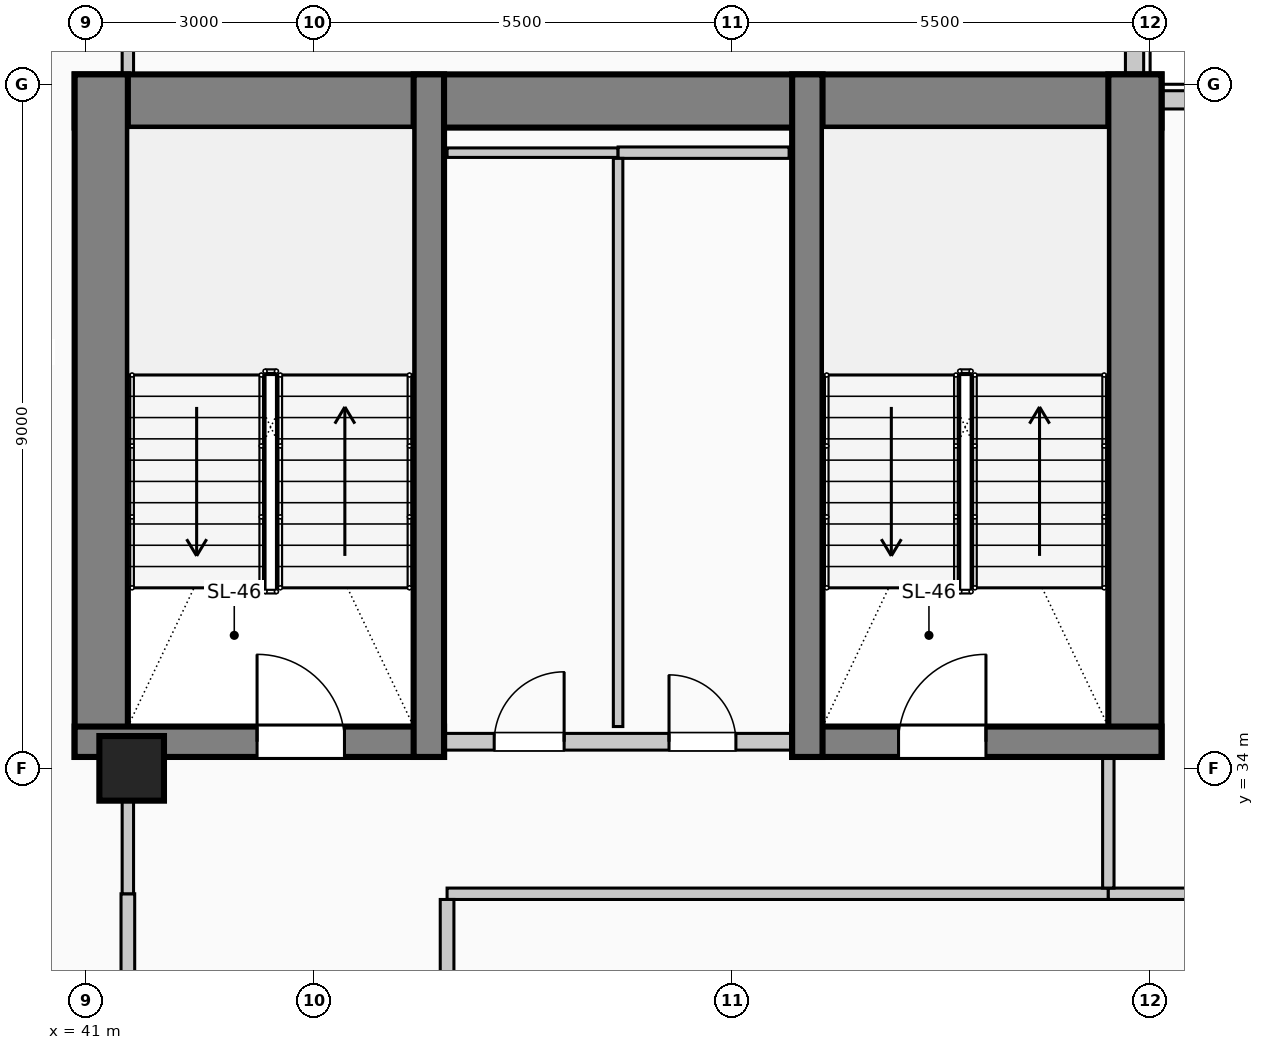
"""IFC4 building model, lengths in metres.
Left out: names, types, materials, properties, quantities, classifications, styles, units other than length and angle.
Written with IfcOpenShell. Run it as: python <this file> out.ifc"""

import sys

from ifc_helpers import new_model, si_unit, direction, frame, frame_2d, origin, origin_2d, place, context, subcontext, project, spatial, rectangle, circle, extrude, element, fill, save


model = new_model("IFC4")
c1 = context("Model", 3, precision=1e-05, world=origin(), true_north=direction((0.0, 1.0)))
c2 = subcontext(c1, "Body", "Model", "MODEL_VIEW")
j1 = project(units=[si_unit("LENGTHUNIT", "METRE"), si_unit("PLANEANGLEUNIT", "RADIAN")], contexts=[c1])
p1 = place(None, origin())
s1 = spatial("IfcSite", under=j1, at=p1, CompositionType="ELEMENT")
p2 = place(p1, origin())
s2 = spatial("IfcBuilding", under=s1, at=p2, CompositionType="ELEMENT")
p3 = place(p2, frame((0.0, 0.0, 226.6)))
s3 = spatial("IfcBuildingStorey", under=s2, at=p3, CompositionType="ELEMENT", Elevation=226.6)
p4 = place(p3, frame((40.85, 42.78, 0.0), z_axis=(0.0, 0.0, 1.0), x_axis=(1.0, 0.0, 0.0)))
e1 = element("IfcWall", 1, at=p4, inside=s3, PredefinedType="SHEAR", context=c2, shape_type="SweptSolid", body=[
    extrude(rectangle(XDim=14.3, YDim=0.7, at=frame_2d((7.15, 0.0))), origin(), (0.0, 0.0, 1.0), 4.0),
])
for number, where, z_axis, x_axis in (
    (2, (41.2, 34.15, 0.0), (0.0, 0.0, 1.0), (0.0, 1.0, 0.0)),
    (3, (54.8, 34.15, 0.0), (0.0, 0.0, 1.0), (0.0, 1.0, 0.0)),
):
    element("IfcWall", number, at=place(p3, frame(where, z_axis=z_axis, x_axis=x_axis)), inside=s3, PredefinedType="SHEAR", context=c2, shape_type="SweptSolid", body=[
        extrude(rectangle(XDim=8.98, YDim=0.7, at=frame_2d((4.49, 0.0))), origin(), (0.0, 0.0, 1.0), 4.0),
    ])
p5 = place(p3, frame((40.85, 34.35, 0.0), z_axis=(0.0, 0.0, 1.0), x_axis=(1.0, 0.0, 0.0)))
e4 = element("IfcWall", 4, at=p5, inside=s3, PredefinedType="SHEAR", context=c2, shape_type="SweptSolid", body=[
    extrude(rectangle(XDim=4.86, YDim=0.4, at=frame_2d((2.43, 0.0))), origin(), (0.0, 0.0, 1.0), 4.0),
])
p6 = place(p5, frame((2.4, 0.0, 0.0)))
e5 = element("IfcOpeningElement", 5, at=p6, cuts=e4, PredefinedType="OPENING", context=c2, shape_type="SweptSolid", body=[
    extrude(rectangle(XDim=1.15, YDim=2.2, at=frame_2d((0.575, 1.1))), frame((0.0, 0.21, 0.0), z_axis=(0.0, -1.0, 0.0), x_axis=(1.0, 0.0, 0.0)), (0.0, 0.0, 1.0), 0.42),
])
p7 = place(p3, frame((45.51, 34.15, 0.0), z_axis=(0.0, 0.0, 1.0), x_axis=(0.0, 1.0, 0.0)))
e6 = element("IfcWall", 6, at=p7, inside=s3, PredefinedType="SHEAR", context=c2, shape_type="SweptSolid", body=[
    extrude(rectangle(XDim=8.98, YDim=0.4, at=frame_2d((4.49, 0.0))), origin(), (0.0, 0.0, 1.0), 4.0),
])
p8 = place(p3, frame((50.29, 34.35, 0.0), z_axis=(0.0, 0.0, 1.0), x_axis=(1.0, 0.0, 0.0)))
e7 = element("IfcWall", 7, at=p8, inside=s3, PredefinedType="SHEAR", context=c2, shape_type="SweptSolid", body=[
    extrude(rectangle(XDim=4.86, YDim=0.4, at=frame_2d((2.43, 0.0))), origin(), (0.0, 0.0, 1.0), 4.0),
])
p9 = place(p8, frame((1.4, 0.0, 0.0)))
e8 = element("IfcOpeningElement", 8, at=p9, cuts=e7, PredefinedType="OPENING", context=c2, shape_type="SweptSolid", body=[
    extrude(rectangle(XDim=1.15, YDim=2.2, at=frame_2d((0.575, 1.1))), frame((0.0, 0.21, 0.0), z_axis=(0.0, -1.0, 0.0), x_axis=(1.0, 0.0, 0.0)), (0.0, 0.0, 1.0), 0.42),
])
p10 = place(p3, frame((50.49, 34.15, 0.0), z_axis=(0.0, 0.0, 1.0), x_axis=(0.0, 1.0, 0.0)))
e9 = element("IfcWall", 9, at=p10, inside=s3, PredefinedType="SHEAR", context=c2, shape_type="SweptSolid", body=[
    extrude(rectangle(XDim=8.98, YDim=0.4, at=frame_2d((4.49, 0.0))), origin(), (0.0, 0.0, 1.0), 4.0),
])
p11 = place(p3, frame((41.6, 34.0, 0.0), z_axis=(0.0, 0.0, 1.0), x_axis=(1.0, 0.0, 0.0)))
e10 = element("IfcColumn", 10, at=p11, inside=s3, PredefinedType="COLUMN", context=c2, shape_type="SweptSolid", body=[
    extrude(circle(Radius=0.425, at=origin_2d()), origin(), (0.0, 0.0, 1.0), 4.0),
])
p12 = place(p3, frame((54.795, 45.4, 0.0), z_axis=(0.0, 0.0, 1.0), x_axis=(0.0, -1.0, 0.0)))
e11 = element("IfcWall", 11, at=p12, inside=s3, PredefinedType="SOLIDWALL", context=c2, shape_type="SweptSolid", body=[
    extrude(rectangle(XDim=2.265, YDim=0.24, at=frame_2d((1.132, 0.0))), origin(), (0.0, 0.0, 1.0), 3.75),
])
p13 = place(p3, frame((55.155, 42.795, 0.0), z_axis=(0.0, 0.0, 1.0), x_axis=(1.0, 0.0, 0.0)))
e12 = element("IfcWall", 12, at=p13, inside=s3, PredefinedType="SOLIDWALL", context=c2, shape_type="SweptSolid", body=[
    extrude(rectangle(XDim=2.245, YDim=0.24, at=frame_2d((1.123, 0.0))), origin(), (0.0, 0.0, 1.0), 3.75),
])
p14 = place(p3, frame((45.72, 34.35, 0.0), z_axis=(0.0, 0.0, 1.0), x_axis=(1.0, 0.0, 0.0)))
e13 = element("IfcWall", 13, at=p14, inside=s3, PredefinedType="PARTITIONING", context=c2, shape_type="SweptSolid", body=[
    extrude(rectangle(XDim=4.56, YDim=0.22, at=frame_2d((2.28, 0.0))), origin(), (0.0, 0.0, 1.0), 3.75),
])
p15 = place(p14, frame((0.65, 0.0, 0.0)))
e14 = element("IfcOpeningElement", 14, at=p15, cuts=e13, PredefinedType="OPENING", context=c2, shape_type="SweptSolid", body=[
    extrude(rectangle(XDim=0.92, YDim=2.1, at=frame_2d((0.46, 1.05))), frame((0.0, 0.12, 0.0), z_axis=(0.0, -1.0, 0.0), x_axis=(1.0, 0.0, 0.0)), (0.0, 0.0, 1.0), 0.24),
])
p16 = place(p14, frame((2.95, 0.0, 0.0)))
e15 = element("IfcOpeningElement", 15, at=p16, cuts=e13, PredefinedType="OPENING", context=c2, shape_type="SweptSolid", body=[
    extrude(rectangle(XDim=0.88, YDim=2.1, at=frame_2d((0.44, 1.05))), frame((0.0, 0.12, 0.0), z_axis=(0.0, -1.0, 0.0), x_axis=(1.0, 0.0, 0.0)), (0.0, 0.0, 1.0), 0.24),
])
p17 = place(p3, frame((45.75, 32.35, 0.0), z_axis=(0.0, 0.0, 1.0), x_axis=(1.0, 0.0, 0.0)))
e16 = element("IfcWall", 16, at=p17, inside=s3, PredefinedType="PARTITIONING", context=c2, shape_type="SweptSolid", body=[
    extrude(rectangle(XDim=8.7, YDim=0.15, at=frame_2d((4.35, 0.0))), origin(), (0.0, 0.0, 1.0), 3.75),
])
p18 = place(p3, frame((54.45, 32.35, 0.0), z_axis=(0.0, 0.0, 1.0), x_axis=(1.0, 0.0, 0.0)))
e17 = element("IfcWall", 17, at=p18, inside=s3, PredefinedType="PARTITIONING", context=c2, shape_type="SweptSolid", body=[
    extrude(rectangle(XDim=2.83, YDim=0.15, at=frame_2d((1.415, 0.0))), origin(), (0.0, 0.0, 1.0), 3.75),
])
p19 = place(p3, frame((45.75, 42.1, 0.0), z_axis=(0.0, 0.0, 1.0), x_axis=(1.0, 0.0, 0.0)))
e18 = element("IfcWall", 18, at=p19, inside=s3, PredefinedType="PARTITIONING", context=c2, shape_type="SweptSolid", body=[
    extrude(rectangle(XDim=2.25, YDim=0.125, at=frame_2d((1.125, 0.0))), origin(), (0.0, 0.0, 1.0), 3.75),
])
p20 = place(p3, frame((48.0, 42.1, 0.0), z_axis=(0.0, 0.0, 1.0), x_axis=(1.0, 0.0, 0.0)))
e19 = element("IfcWall", 19, at=p20, inside=s3, PredefinedType="PARTITIONING", context=c2, shape_type="SweptSolid", body=[
    extrude(rectangle(XDim=2.25, YDim=0.15, at=frame_2d((1.125, 0.0))), origin(), (0.0, 0.0, 1.0), 3.75),
])
p21 = place(p3, frame((41.55, 29.14, 0.0), z_axis=(0.0, 0.0, 1.0), x_axis=(0.0, 1.0, 0.0)))
e20 = element("IfcWall", 20, at=p21, inside=s3, PredefinedType="PARTITIONING", context=c2, shape_type="SweptSolid", body=[
    extrude(rectangle(XDim=3.21, YDim=0.18, at=frame_2d((1.605, 0.0))), origin(), (0.0, 0.0, 1.0), 3.145),
])
p22 = place(p3, frame((41.55, 32.35, 0.0), z_axis=(0.0, 0.0, 1.0), x_axis=(0.0, 1.0, 0.0)))
e21 = element("IfcWall", 21, at=p22, inside=s3, PredefinedType="PARTITIONING", context=c2, shape_type="SweptSolid", body=[
    extrude(rectangle(XDim=1.225, YDim=0.15, at=frame_2d((0.612, 0.0))), origin(), (0.0, 0.0, 1.0), 3.145),
])
p23 = place(p3, frame((41.55, 43.13, 0.0), z_axis=(0.0, 0.0, 1.0), x_axis=(0.0, 1.0, 0.0)))
e22 = element("IfcWall", 22, at=p23, inside=s3, PredefinedType="PARTITIONING", context=c2, shape_type="SweptSolid", body=[
    extrude(rectangle(XDim=1.62, YDim=0.15, at=frame_2d((0.81, 0.0))), origin(), (0.0, 0.0, 1.0), 3.75),
])
p24 = place(p3, frame((45.75, 29.14, 0.0), z_axis=(0.0, 0.0, 1.0), x_axis=(0.0, 1.0, 0.0)))
e23 = element("IfcWall", 23, at=p24, inside=s3, PredefinedType="PARTITIONING", context=c2, shape_type="SweptSolid", body=[
    extrude(rectangle(XDim=3.135, YDim=0.18, at=frame_2d((1.567, 0.0))), origin(), (0.0, 0.0, 1.0), 3.75),
])
p25 = place(p3, frame((48.0, 34.55, 0.0), z_axis=(0.0, 0.0, 1.0), x_axis=(0.0, 1.0, 0.0)))
e24 = element("IfcWall", 24, at=p25, inside=s3, PredefinedType="PARTITIONING", context=c2, shape_type="SweptSolid", body=[
    extrude(rectangle(XDim=7.475, YDim=0.125, at=frame_2d((3.737, 0.0))), origin(), (0.0, 0.0, 1.0), 3.75),
])
p26 = place(p3, frame((54.45, 32.425, 0.0), z_axis=(0.0, 0.0, 1.0), x_axis=(0.0, 1.0, 0.0)))
e25 = element("IfcWall", 25, at=p26, inside=s3, PredefinedType="PARTITIONING", context=c2, shape_type="SweptSolid", body=[
    extrude(rectangle(XDim=1.725, YDim=0.15, at=frame_2d((0.862, 0.0))), origin(), (0.0, 0.0, 1.0), 3.75),
])
p27 = place(p6, origin())
e26 = element("IfcDoor", 26, at=p27, inside=s3, OperationType="SINGLE_SWING_LEFT", PredefinedType="DOOR", context=c2, shape_type="SweptSolid", body=[
    extrude(rectangle(XDim=1.15, YDim=2.2, at=frame_2d((0.575, 1.1))), frame((0.0, 0.025, 0.0), z_axis=(0.0, -1.0, 0.0), x_axis=(1.0, 0.0, 0.0)), (0.0, 0.0, 1.0), 0.05),
])
fill(e5, e26)
p28 = place(p15, origin())
e27 = element("IfcDoor", 27, at=p28, inside=s3, OperationType="SINGLE_SWING_RIGHT", PredefinedType="DOOR", context=c2, shape_type="SweptSolid", body=[
    extrude(rectangle(XDim=0.92, YDim=2.1, at=frame_2d((0.46, 1.05))), frame((0.0, 0.025, 0.0), z_axis=(0.0, -1.0, 0.0), x_axis=(1.0, 0.0, 0.0)), (0.0, 0.0, 1.0), 0.05),
])
fill(e14, e27)
p29 = place(p16, origin())
e28 = element("IfcDoor", 28, at=p29, inside=s3, OperationType="SINGLE_SWING_LEFT", PredefinedType="DOOR", context=c2, shape_type="SweptSolid", body=[
    extrude(rectangle(XDim=0.88, YDim=2.1, at=frame_2d((0.44, 1.05))), frame((0.0, 0.025, 0.0), z_axis=(0.0, -1.0, 0.0), x_axis=(1.0, 0.0, 0.0)), (0.0, 0.0, 1.0), 0.05),
])
fill(e15, e28)
p30 = place(p9, origin())
e29 = element("IfcDoor", 29, at=p30, inside=s3, OperationType="SINGLE_SWING_RIGHT", PredefinedType="DOOR", context=c2, shape_type="SweptSolid", body=[
    extrude(rectangle(XDim=1.15, YDim=2.2, at=frame_2d((0.575, 1.1))), frame((0.0, 0.025, 0.0), z_axis=(0.0, -1.0, 0.0), x_axis=(1.0, 0.0, 0.0)), (0.0, 0.0, 1.0), 0.05),
])
fill(e8, e29)
save(model, sys.argv[1])
